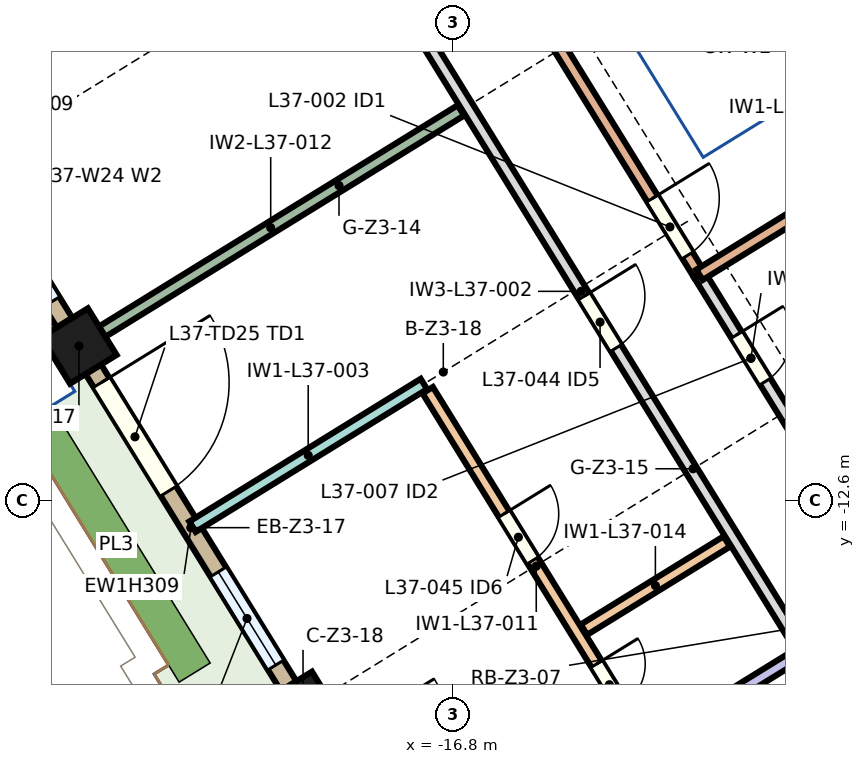
"""IFC4 building model, lengths in metres.
Left out: names, types, materials, properties, quantities, classifications, styles, units other than length and angle.
Written with IfcOpenShell. Run it as: python <this file> out.ifc"""

import sys

from ifc_helpers import new_model, si_unit, direction, frame, frame_2d, origin, origin_2d, place, context, subcontext, project, spatial, rectangle, extrude, element, fill, save


model = new_model("IFC4")
c1 = context("Model", 3, precision=1e-05, world=origin(), true_north=direction((0.0, 1.0)))
c2 = subcontext(c1, "Body", "Model", "MODEL_VIEW")
j1 = project(units=[si_unit("LENGTHUNIT", "METRE"), si_unit("PLANEANGLEUNIT", "RADIAN")], contexts=[c1])
p1 = place(None, origin())
s1 = spatial("IfcSite", under=j1, at=p1, CompositionType="ELEMENT")
p2 = place(p1, origin())
s2 = spatial("IfcBuilding", under=s1, at=p2, CompositionType="ELEMENT")
p3 = place(p2, frame((0.0, 0.0, 170.4)))
s3 = spatial("IfcBuildingStorey", under=s2, at=p3, CompositionType="ELEMENT", Elevation=170.4)
for number, where, z_axis, x_axis in (
    (1, (-22.95, -10.032, 0.0), (0.0, 0.0, 1.0), (0.851, 0.525, 0.0)),
    (2, (-19.265, -16.007, 0.0), (0.0, 0.0, 1.0), (0.851, 0.525, 0.0)),
):
    element("IfcColumn", number, at=place(p3, frame(where, z_axis=z_axis, x_axis=x_axis)), inside=s3, PredefinedType="COLUMN", context=c2, shape_type="SweptSolid", body=[
        extrude(rectangle(XDim=0.9, YDim=0.9, at=origin_2d()), origin(), (0.0, 0.0, 1.0), 3.55),
    ])
p4 = place(p3, frame((-26.399, -4.44, 0.0), z_axis=(0.0, 0.0, 1.0), x_axis=(0.524987447654, -0.851109969279, 0.0)))
e3 = element("IfcWall", 3, at=p4, inside=s3, PredefinedType="SOLIDWALL", context=c2, shape_type="SweptSolid", body=[
    extrude(rectangle(XDim=6.12, YDim=0.3, at=frame_2d((3.06, 0.0))), origin(), (0.0, 0.0, 1.0), 3.09),
])
p5 = place(p4, frame((0.255, 0.0, 0.0)))
e4 = element("IfcOpeningElement", 4, at=p5, cuts=e3, PredefinedType="OPENING", context=c2, shape_type="SweptSolid", body=[
    extrude(rectangle(XDim=2.1, YDim=2.4, at=frame_2d((1.05, 1.2))), frame((0.0, 0.16, 0.0), z_axis=(0.0, -1.0, 0.0), x_axis=(1.0, 0.0, 0.0)), (0.0, 0.0, 1.0), 0.32),
])
p6 = place(p4, frame((3.915, 0.0, 0.9)))
e5 = element("IfcOpeningElement", 5, at=p6, cuts=e3, PredefinedType="OPENING", context=c2, shape_type="SweptSolid", body=[
    extrude(rectangle(XDim=1.8, YDim=1.5, at=frame_2d((0.9, 0.75))), frame((0.0, 0.16, 0.0), z_axis=(0.0, -1.0, 0.0), x_axis=(1.0, 0.0, 0.0)), (0.0, 0.0, 1.0), 0.32),
])
p7 = place(p3, frame((-22.714, -10.415, 0.0), z_axis=(0.0, 0.0, 1.0), x_axis=(0.524987447654, -0.851109969279, 0.0)))
e6 = element("IfcWall", 6, at=p7, inside=s3, PredefinedType="SOLIDWALL", context=c2, shape_type="SweptSolid", body=[
    extrude(rectangle(XDim=6.12, YDim=0.3, at=frame_2d((3.06, 0.0))), origin(), (0.0, 0.0, 1.0), 3.09),
])
p8 = place(p7, frame((0.255, 0.0, 0.0)))
e7 = element("IfcOpeningElement", 7, at=p8, cuts=e6, PredefinedType="OPENING", context=c2, shape_type="SweptSolid", body=[
    extrude(rectangle(XDim=2.1, YDim=2.4, at=frame_2d((1.05, 1.2))), frame((0.0, 0.16, 0.0), z_axis=(0.0, -1.0, 0.0), x_axis=(1.0, 0.0, 0.0)), (0.0, 0.0, 1.0), 0.32),
])
p9 = place(p7, frame((3.915, 0.0, 0.9)))
e8 = element("IfcOpeningElement", 8, at=p9, cuts=e6, PredefinedType="OPENING", context=c2, shape_type="SweptSolid", body=[
    extrude(rectangle(XDim=1.8, YDim=1.5, at=frame_2d((0.9, 0.75))), frame((0.0, 0.16, 0.0), z_axis=(0.0, -1.0, 0.0), x_axis=(1.0, 0.0, 0.0)), (0.0, 0.0, 1.0), 0.32),
])
p10 = place(p3, frame((-22.037, 2.774, 0.0), z_axis=(0.0, 0.0, 1.0), x_axis=(0.524973936666, -0.85111830307, 0.0)))
e9 = element("IfcWall", 9, at=p10, inside=s3, PredefinedType="PARTITIONING", context=c2, shape_type="SweptSolid", body=[
    extrude(rectangle(XDim=27.98, YDim=0.2, at=frame_2d((13.99, 0.0))), origin(), (0.0, 0.0, 1.0), 3.55),
])
p11 = place(p10, frame((4.55, 0.0, 0.0)))
e10 = element("IfcOpeningElement", 10, at=p11, cuts=e9, PredefinedType="OPENING", context=c2, shape_type="SweptSolid", body=[
    extrude(rectangle(XDim=1.2, YDim=2.1, at=frame_2d((0.6, 1.05))), frame((0.0, 0.11, 0.0), z_axis=(0.0, -1.0, 0.0), x_axis=(1.0, 0.0, 0.0)), (0.0, 0.0, 1.0), 0.22),
])
p12 = place(p10, frame((14.085, 0.0, 0.0)))
e11 = element("IfcOpeningElement", 11, at=p12, cuts=e9, PredefinedType="OPENING", context=c2, shape_type="SweptSolid", body=[
    extrude(rectangle(XDim=1.0, YDim=2.1, at=frame_2d((0.5, 1.05))), frame((0.0, 0.11, 0.0), z_axis=(0.0, -1.0, 0.0), x_axis=(1.0, 0.0, 0.0)), (0.0, 0.0, 1.0), 0.22),
])
p13 = place(p10, frame((24.89, 0.0, 0.0)))
e12 = element("IfcOpeningElement", 12, at=p13, cuts=e9, PredefinedType="OPENING", context=c2, shape_type="SweptSolid", body=[
    extrude(rectangle(XDim=0.95, YDim=2.1, at=frame_2d((0.475, 1.05))), frame((0.0, 0.11, 0.0), z_axis=(0.0, -1.0, 0.0), x_axis=(1.0, 0.0, 0.0)), (0.0, 0.0, 1.0), 0.22),
])
p14 = place(p3, frame((-21.082, -13.004, 0.0), z_axis=(0.0, 0.0, 1.0), x_axis=(0.851125318938, 0.524962561963, 0.0)))
e13 = element("IfcWall", 13, at=p14, inside=s3, PredefinedType="PARTITIONING", context=c2, shape_type="SweptSolid", body=[
    extrude(rectangle(XDim=4.47, YDim=0.2, at=frame_2d((2.235, 0.0))), origin(), (0.0, 0.0, 1.0), 3.05),
])
p15 = place(p3, frame((-17.215, -10.759, 0.0), z_axis=(0.0, 0.0, 1.0), x_axis=(0.524974538192, -0.851117932046, 0.0)))
e14 = element("IfcWall", 14, at=p15, inside=s3, PredefinedType="PARTITIONING", context=c2, shape_type="SweptSolid", body=[
    extrude(rectangle(XDim=6.8, YDim=0.2, at=frame_2d((3.4, 0.0))), origin(), (0.0, 0.0, 1.0), 3.55),
])
p16 = place(p15, frame((2.39, 0.0, 0.0)))
e15 = element("IfcOpeningElement", 15, at=p16, cuts=e14, PredefinedType="OPENING", context=c2, shape_type="SweptSolid", body=[
    extrude(rectangle(XDim=0.9, YDim=2.1, at=frame_2d((0.45, 1.05))), frame((0.0, 0.11, 0.0), z_axis=(0.0, -1.0, 0.0), x_axis=(1.0, 0.0, 0.0)), (0.0, 0.0, 1.0), 0.22),
])
p17 = place(p15, frame((5.29, 0.0, 0.0)))
e16 = element("IfcOpeningElement", 16, at=p17, cuts=e14, PredefinedType="OPENING", context=c2, shape_type="SweptSolid", body=[
    extrude(rectangle(XDim=0.8, YDim=2.1, at=frame_2d((0.4, 1.05))), frame((0.0, 0.11, 0.0), z_axis=(0.0, -1.0, 0.0), x_axis=(1.0, 0.0, 0.0)), (0.0, 0.0, 1.0), 0.22),
])
p18 = place(p3, frame((-16.669, -6.158, 0.0), z_axis=(0.0, 0.0, 1.0), x_axis=(-0.851109277096, -0.52498856982, 0.0)))
e17 = element("IfcWall", 17, at=p18, inside=s3, PredefinedType="PARTITIONING", context=c2, shape_type="SweptSolid", body=[
    extrude(rectangle(XDim=7.35, YDim=0.2, at=frame_2d((3.675, 0.0))), origin(), (0.0, 0.0, 1.0), 2.65),
])
p19 = place(p3, frame((-15.896, -3.755, 0.0), z_axis=(0.0, 0.0, 1.0), x_axis=(0.524982543144, -0.851112994493, 0.0)))
e18 = element("IfcWall", 18, at=p19, inside=s3, PredefinedType="SOLIDWALL", context=c2, shape_type="SweptSolid", body=[
    extrude(rectangle(XDim=6.0, YDim=0.2, at=frame_2d((3.0, 0.0))), origin(), (0.0, 0.0, 1.0), 3.55),
])
p20 = place(p19, frame((4.525, 0.0, 0.0)))
e19 = element("IfcOpeningElement", 19, at=p20, cuts=e18, PredefinedType="OPENING", context=c2, shape_type="SweptSolid", body=[
    extrude(rectangle(XDim=1.1, YDim=2.1, at=frame_2d((0.55, 1.05))), frame((0.0, 0.11, 0.0), z_axis=(0.0, -1.0, 0.0), x_axis=(1.0, 0.0, 0.0)), (0.0, 0.0, 1.0), 0.22),
])
p21 = place(p3, frame((-14.645, -14.696, 0.0), z_axis=(0.0, 0.0, 1.0), x_axis=(0.851129367012, 0.524955998737, 0.0)))
e20 = element("IfcWall", 20, at=p21, inside=s3, PredefinedType="PARTITIONING", context=c2, shape_type="SweptSolid", body=[
    extrude(rectangle(XDim=2.76, YDim=0.2, at=frame_2d((1.38, 0.0))), origin(), (0.0, 0.0, 1.0), 3.55),
])
p22 = place(p3, frame((-12.746, -8.861, 0.0), z_axis=(0.0, 0.0, 1.0), x_axis=(0.524959112102, -0.851127446756, 0.0)))
e21 = element("IfcWall", 21, at=p22, inside=s3, PredefinedType="PARTITIONING", context=c2, shape_type="SweptSolid", body=[
    extrude(rectangle(XDim=3.224, YDim=0.2, at=frame_2d((1.612, 0.0))), origin(), (0.0, 0.0, 1.0), 3.55),
])
p23 = place(p22, frame((1.162, 0.0, 0.0)))
e22 = element("IfcOpeningElement", 22, at=p23, cuts=e21, PredefinedType="OPENING", context=c2, shape_type="SweptSolid", body=[
    extrude(rectangle(XDim=0.9, YDim=2.1, at=frame_2d((0.45, 1.05))), frame((0.0, 0.11, 0.0), z_axis=(0.0, -1.0, 0.0), x_axis=(1.0, 0.0, 0.0)), (0.0, 0.0, 1.0), 0.22),
])
p24 = place(p3, frame((-12.746, -8.861, 0.0), z_axis=(0.0, 0.0, 1.0), x_axis=(0.851120688733, 0.524970068871, 0.0)))
e23 = element("IfcWall", 23, at=p24, inside=s3, PredefinedType="SOLIDWALL", context=c2, shape_type="SweptSolid", body=[
    extrude(rectangle(XDim=4.167, YDim=0.2, at=frame_2d((2.083, 0.0))), origin(), (0.0, 0.0, 1.0), 3.55),
])
p25 = place(p3, frame((-11.141, -15.12, 0.0), z_axis=(0.0, 0.0, 1.0), x_axis=(-0.851109277096, -0.52498856982, 0.0)))
e24 = element("IfcWall", 24, at=p25, inside=s3, PredefinedType="PARTITIONING", context=c2, shape_type="SweptSolid", body=[
    extrude(rectangle(XDim=7.35, YDim=0.2, at=frame_2d((3.675, 0.0))), origin(), (0.0, 0.0, 1.0), 3.05),
])
p26 = place(p3, frame((-9.199, -6.674, 0.0), z_axis=(0.0, 0.0, 1.0), x_axis=(-0.524942245614, 0.851137849452, 0.0)))
e25 = element("IfcWall", 25, at=p26, inside=s3, PredefinedType="SOLIDWALL", context=c2, shape_type="SweptSolid", body=[
    extrude(rectangle(XDim=4.9, YDim=0.2, at=frame_2d((2.45, 0.0))), origin(), (0.0, 0.0, 1.0), 3.55),
])
p27 = place(p6, origin())
e26 = element("IfcWindow", 26, at=p27, inside=s3, PartitioningType="SINGLE_PANEL", PredefinedType="WINDOW", context=c2, shape_type="SweptSolid", body=[
    extrude(rectangle(XDim=1.8, YDim=1.5, at=frame_2d((0.9, 0.75))), frame((0.0, 0.03, 0.0), z_axis=(0.0, -1.0, 0.0), x_axis=(1.0, 0.0, 0.0)), (0.0, 0.0, 1.0), 0.06),
])
fill(e5, e26)
p28 = place(p8, origin())
e27 = element("IfcDoor", 27, at=p28, inside=s3, OperationType="SLIDING_TO_LEFT", PredefinedType="DOOR", context=c2, shape_type="SweptSolid", body=[
    extrude(rectangle(XDim=2.1, YDim=2.4, at=frame_2d((1.05, 1.2))), frame((0.0, 0.025, 0.0), z_axis=(0.0, -1.0, 0.0), x_axis=(1.0, 0.0, 0.0)), (0.0, 0.0, 1.0), 0.05),
])
fill(e7, e27)
p29 = place(p9, origin())
e28 = element("IfcWindow", 28, at=p29, inside=s3, PartitioningType="SINGLE_PANEL", PredefinedType="WINDOW", context=c2, shape_type="SweptSolid", body=[
    extrude(rectangle(XDim=1.8, YDim=1.5, at=frame_2d((0.9, 0.75))), frame((0.0, 0.03, 0.0), z_axis=(0.0, -1.0, 0.0), x_axis=(1.0, 0.0, 0.0)), (0.0, 0.0, 1.0), 0.06),
])
fill(e8, e28)
p30 = place(p20, origin())
e29 = element("IfcDoor", 29, at=p30, inside=s3, OperationType="NOTDEFINED", PredefinedType="DOOR", context=c2, shape_type="SweptSolid", body=[
    extrude(rectangle(XDim=1.1, YDim=2.1, at=frame_2d((0.55, 1.05))), frame((0.0, 0.025, 0.0), z_axis=(0.0, -1.0, 0.0), x_axis=(1.0, 0.0, 0.0)), (0.0, 0.0, 1.0), 0.05),
])
fill(e19, e29)
p31 = place(p23, origin())
e30 = element("IfcDoor", 30, at=p31, inside=s3, OperationType="NOTDEFINED", PredefinedType="DOOR", context=c2, shape_type="SweptSolid", body=[
    extrude(rectangle(XDim=0.9, YDim=2.1, at=frame_2d((0.45, 1.05))), frame((0.0, 0.025, 0.0), z_axis=(0.0, -1.0, 0.0), x_axis=(1.0, 0.0, 0.0)), (0.0, 0.0, 1.0), 0.05),
])
fill(e22, e30)
p32 = place(p12, origin())
e31 = element("IfcDoor", 31, at=p32, inside=s3, OperationType="NOTDEFINED", PredefinedType="DOOR", context=c2, shape_type="SweptSolid", body=[
    extrude(rectangle(XDim=1.0, YDim=2.1, at=frame_2d((0.5, 1.05))), frame((0.0, 0.025, 0.0), z_axis=(0.0, -1.0, 0.0), x_axis=(1.0, 0.0, 0.0)), (0.0, 0.0, 1.0), 0.05),
])
fill(e11, e31)
p33 = place(p16, origin())
e32 = element("IfcDoor", 32, at=p33, inside=s3, OperationType="NOTDEFINED", PredefinedType="DOOR", context=c2, shape_type="SweptSolid", body=[
    extrude(rectangle(XDim=0.9, YDim=2.1, at=frame_2d((0.45, 1.05))), frame((0.0, 0.025, 0.0), z_axis=(0.0, -1.0, 0.0), x_axis=(1.0, 0.0, 0.0)), (0.0, 0.0, 1.0), 0.05),
])
fill(e15, e32)
p34 = place(p17, origin())
e33 = element("IfcDoor", 33, at=p34, inside=s3, OperationType="NOTDEFINED", PredefinedType="DOOR", context=c2, shape_type="SweptSolid", body=[
    extrude(rectangle(XDim=0.8, YDim=2.1, at=frame_2d((0.4, 1.05))), frame((0.0, 0.025, 0.0), z_axis=(0.0, -1.0, 0.0), x_axis=(1.0, 0.0, 0.0)), (0.0, 0.0, 1.0), 0.05),
])
fill(e16, e33)
save(model, sys.argv[1])
